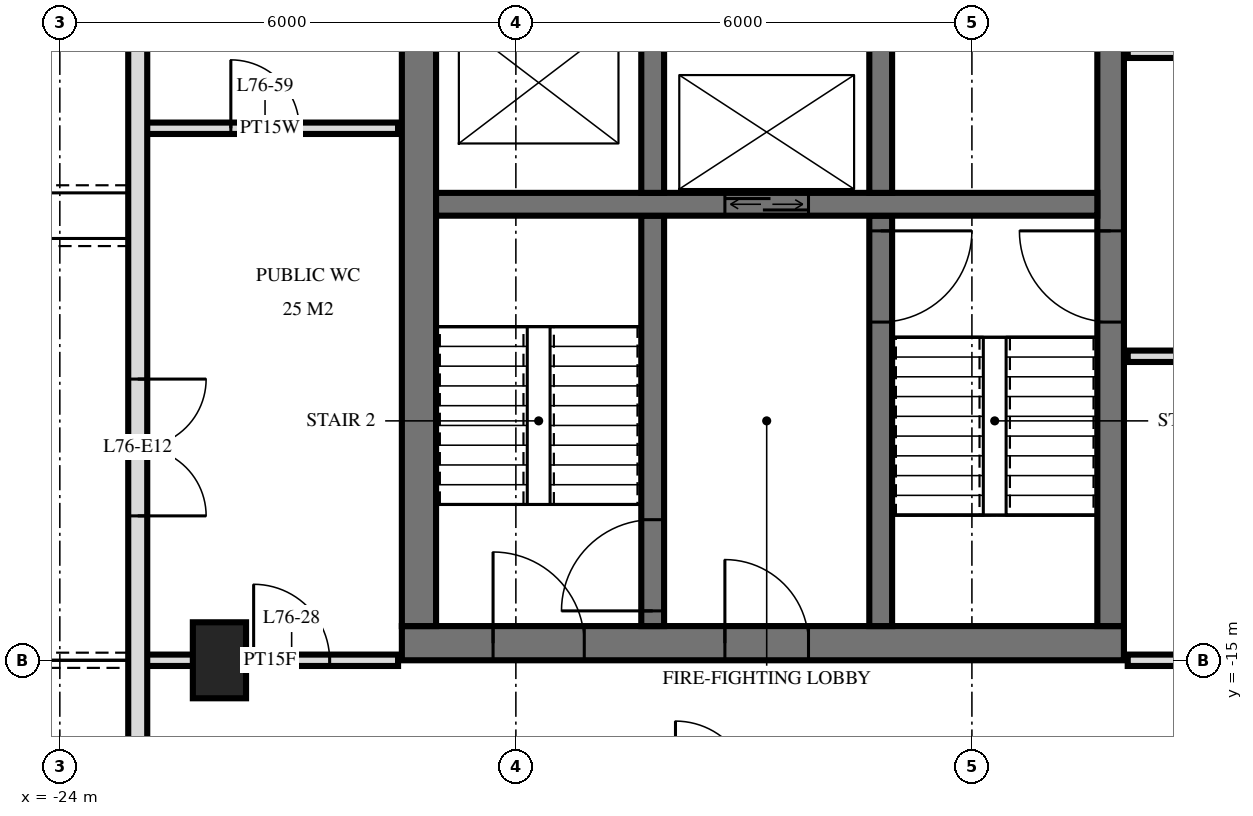
"""IFC4 building model, lengths in metres.
Left out: names, types, materials, properties, quantities, classifications, styles, units other than length and angle.
Written with IfcOpenShell. Run it as: python <this file> out.ifc"""

import sys

from ifc_helpers import new_model, si_unit, direction, frame, frame_2d, origin, origin_2d, place, context, subcontext, project, spatial, rectangle, extrude, element, fill, save


model = new_model("IFC4")
c1 = context("Model", 3, precision=1e-05, world=origin(), true_north=direction((0.0, 1.0)))
c2 = subcontext(c1, "Body", "Model", "MODEL_VIEW")
j1 = project(units=[si_unit("LENGTHUNIT", "METRE"), si_unit("PLANEANGLEUNIT", "RADIAN")], contexts=[c1])
p1 = place(None, origin())
s1 = spatial("IfcSite", under=j1, at=p1, CompositionType="ELEMENT")
p2 = place(p1, origin())
s2 = spatial("IfcBuilding", under=s1, at=p2, CompositionType="ELEMENT")
p3 = place(p2, frame((0.0, 0.0, 287.6)))
s3 = spatial("IfcBuildingStorey", under=s2, at=p3, CompositionType="ELEMENT", Elevation=287.6)
p4 = place(p3, frame((-21.9, -15.0, 0.0), z_axis=(0.0, 0.0, 1.0), x_axis=(0.0, 1.0, 0.0)))
e1 = element("IfcColumn", 1, at=p4, inside=s3, PredefinedType="COLUMN", context=c2, shape_type="SweptSolid", body=[
    extrude(rectangle(XDim=1.0, YDim=0.7, at=origin_2d()), origin(), (0.0, 0.0, 1.0), 3.5),
])
p5 = place(p3, frame((-19.5, -14.775, 0.0), z_axis=(0.0, 0.0, 1.0), x_axis=(1.0, 0.0, 0.0)))
e2 = element("IfcWall", 2, at=p5, inside=s3, PredefinedType="SHEAR", context=c2, shape_type="SweptSolid", body=[
    extrude(rectangle(XDim=9.5, YDim=0.45, at=frame_2d((4.75, 0.0))), origin(), (0.0, 0.0, 1.0), 3.5),
])
p6 = place(p5, frame((1.2, 0.0, 0.0)))
e3 = element("IfcOpeningElement", 3, at=p6, cuts=e2, PredefinedType="OPENING", context=c2, shape_type="SweptSolid", body=[
    extrude(rectangle(XDim=1.2, YDim=2.1, at=frame_2d((0.6, 1.05))), frame((0.0, 0.235, 0.0), z_axis=(0.0, -1.0, 0.0), x_axis=(1.0, 0.0, 0.0)), (0.0, 0.0, 1.0), 0.47),
])
p7 = place(p5, frame((4.25, 0.0, 0.0)))
e4 = element("IfcOpeningElement", 4, at=p7, cuts=e2, PredefinedType="OPENING", context=c2, shape_type="SweptSolid", body=[
    extrude(rectangle(XDim=1.1, YDim=2.1, at=frame_2d((0.55, 1.05))), frame((0.0, 0.235, 0.0), z_axis=(0.0, -1.0, 0.0), x_axis=(1.0, 0.0, 0.0)), (0.0, 0.0, 1.0), 0.47),
])
p8 = place(p3, frame((-10.175, -14.55, 0.0), z_axis=(0.0, 0.0, 1.0), x_axis=(0.0, 1.0, 0.0)))
e5 = element("IfcWall", 5, at=p8, inside=s3, PredefinedType="SHEAR", context=c2, shape_type="SweptSolid", body=[
    extrude(rectangle(XDim=14.1, YDim=0.35, at=frame_2d((7.05, 0.0))), origin(), (0.0, 0.0, 1.0), 3.5),
])
p9 = place(p8, frame((8.4, 0.0, 0.0)))
e6 = element("IfcOpeningElement", 6, at=p9, cuts=e5, PredefinedType="OPENING", context=c2, shape_type="SweptSolid", body=[
    extrude(rectangle(XDim=1.4, YDim=2.4, at=frame_2d((0.7, 1.2))), frame((0.0, 0.185, 0.0), z_axis=(0.0, -1.0, 0.0), x_axis=(1.0, 0.0, 0.0)), (0.0, 0.0, 1.0), 0.37),
])
p10 = place(p8, frame((10.0, 0.0, 0.0)))
e7 = element("IfcOpeningElement", 7, at=p10, cuts=e5, PredefinedType="OPENING", context=c2, shape_type="SweptSolid", body=[
    extrude(rectangle(XDim=1.4, YDim=2.4, at=frame_2d((0.7, 1.2))), frame((0.0, 0.185, 0.0), z_axis=(0.0, -1.0, 0.0), x_axis=(1.0, 0.0, 0.0)), (0.0, 0.0, 1.0), 0.37),
])
p11 = place(p8, frame((4.0, 0.0, 0.0)))
e8 = element("IfcOpeningElement", 8, at=p11, cuts=e5, PredefinedType="OPENING", context=c2, shape_type="SweptSolid", body=[
    extrude(rectangle(XDim=1.2, YDim=2.1, at=frame_2d((0.6, 1.05))), frame((0.0, 0.185, 0.0), z_axis=(0.0, -1.0, 0.0), x_axis=(1.0, 0.0, 0.0)), (0.0, 0.0, 1.0), 0.37),
])
p12 = place(p3, frame((-19.275, -14.55, 0.0), z_axis=(0.0, 0.0, 1.0), x_axis=(0.0, 1.0, 0.0)))
e9 = element("IfcWall", 9, at=p12, inside=s3, PredefinedType="SHEAR", context=c2, shape_type="SweptSolid", body=[
    extrude(rectangle(XDim=14.1, YDim=0.45, at=frame_2d((7.05, 0.0))), origin(), (0.0, 0.0, 1.0), 3.5),
])
p13 = place(p3, frame((-19.05, -9.0, 0.0), z_axis=(0.0, 0.0, 1.0), x_axis=(1.0, 0.0, 0.0)))
e10 = element("IfcWall", 10, at=p13, inside=s3, PredefinedType="SHEAR", context=c2, shape_type="SweptSolid", body=[
    extrude(rectangle(XDim=8.7, YDim=0.3, at=frame_2d((4.35, 0.0))), origin(), (0.0, 0.0, 1.0), 3.5),
])
p14 = place(p13, frame((3.8, 0.0, 0.0)))
e11 = element("IfcOpeningElement", 11, at=p14, cuts=e10, PredefinedType="OPENING", context=c2, shape_type="SweptSolid", body=[
    extrude(rectangle(XDim=1.1, YDim=2.1, at=frame_2d((0.55, 1.05))), frame((0.0, 0.16, 0.0), z_axis=(0.0, -1.0, 0.0), x_axis=(1.0, 0.0, 0.0)), (0.0, 0.0, 1.0), 0.32),
])
p15 = place(p3, frame((-13.2, -8.85, 0.0), z_axis=(0.0, 0.0, 1.0), x_axis=(0.0, 1.0, 0.0)))
e12 = element("IfcWall", 12, at=p15, inside=s3, PredefinedType="SHEAR", context=c2, shape_type="SweptSolid", body=[
    extrude(rectangle(XDim=2.3, YDim=0.3, at=frame_2d((1.15, 0.0))), origin(), (0.0, 0.0, 1.0), 3.5),
])
p16 = place(p3, frame((-13.2, -14.55, 0.0), z_axis=(0.0, 0.0, 1.0), x_axis=(0.0, 1.0, 0.0)))
e13 = element("IfcWall", 13, at=p16, inside=s3, PredefinedType="SHEAR", context=c2, shape_type="SweptSolid", body=[
    extrude(rectangle(XDim=5.4, YDim=0.3, at=frame_2d((2.7, 0.0))), origin(), (0.0, 0.0, 1.0), 3.5),
])
p17 = place(p16, frame((4.0, 0.0, 0.0)))
e14 = element("IfcOpeningElement", 14, at=p17, cuts=e13, PredefinedType="OPENING", context=c2, shape_type="SweptSolid", body=[
    extrude(rectangle(XDim=1.2, YDim=2.1, at=frame_2d((0.6, 1.05))), frame((0.0, 0.16, 0.0), z_axis=(0.0, -1.0, 0.0), x_axis=(1.0, 0.0, 0.0)), (0.0, 0.0, 1.0), 0.32),
])
p18 = place(p3, frame((-16.2, -8.85, 0.0), z_axis=(0.0, 0.0, 1.0), x_axis=(0.0, 1.0, 0.0)))
e15 = element("IfcWall", 15, at=p18, inside=s3, PredefinedType="SHEAR", context=c2, shape_type="SweptSolid", body=[
    extrude(rectangle(XDim=2.3, YDim=0.3, at=frame_2d((1.15, 0.0))), origin(), (0.0, 0.0, 1.0), 3.5),
])
p19 = place(p3, frame((-16.2, -14.55, 0.0), z_axis=(0.0, 0.0, 1.0), x_axis=(0.0, 1.0, 0.0)))
e16 = element("IfcWall", 16, at=p19, inside=s3, PredefinedType="SHEAR", context=c2, shape_type="SweptSolid", body=[
    extrude(rectangle(XDim=5.4, YDim=0.3, at=frame_2d((2.7, 0.0))), origin(), (0.0, 0.0, 1.0), 3.5),
])
p20 = place(p19, frame((0.2, 0.0, 0.0)))
e17 = element("IfcOpeningElement", 17, at=p20, cuts=e16, PredefinedType="OPENING", context=c2, shape_type="SweptSolid", body=[
    extrude(rectangle(XDim=1.2, YDim=2.1, at=frame_2d((0.6, 1.05))), frame((0.0, 0.16, 0.0), z_axis=(0.0, -1.0, 0.0), x_axis=(1.0, 0.0, 0.0)), (0.0, 0.0, 1.0), 0.32),
])
p21 = place(p3, frame((-22.975, -3.325, 0.0), z_axis=(0.0, 0.0, 1.0), x_axis=(0.0, -1.0, 0.0)))
e18 = element("IfcWall", 18, at=p21, inside=s3, PredefinedType="SOLIDWALL", context=c2, shape_type="SweptSolid", body=[
    extrude(rectangle(XDim=25.951, YDim=0.25, at=frame_2d((12.975, 0.0))), origin(), (0.0, 0.0, 1.0), 3.22),
])
p22 = place(p21, frame((1.475, 0.0, 0.0)))
e19 = element("IfcOpeningElement", 19, at=p22, cuts=e18, PredefinedType="OPENING", context=c2, shape_type="SweptSolid", body=[
    extrude(rectangle(XDim=1.8, YDim=2.4, at=frame_2d((0.9, 1.2))), frame((0.0, 0.135, 0.0), z_axis=(0.0, -1.0, 0.0), x_axis=(1.0, 0.0, 0.0)), (0.0, 0.0, 1.0), 0.27),
])
p23 = place(p21, frame((7.975, 0.0, 0.0)))
e20 = element("IfcOpeningElement", 20, at=p23, cuts=e18, PredefinedType="OPENING", context=c2, shape_type="SweptSolid", body=[
    extrude(rectangle(XDim=1.8, YDim=2.4, at=frame_2d((0.9, 1.2))), frame((0.0, 0.135, 0.0), z_axis=(0.0, -1.0, 0.0), x_axis=(1.0, 0.0, 0.0)), (0.0, 0.0, 1.0), 0.27),
])
p24 = place(p21, frame((18.175, 0.0, 0.0)))
e21 = element("IfcOpeningElement", 21, at=p24, cuts=e18, PredefinedType="OPENING", context=c2, shape_type="SweptSolid", body=[
    extrude(rectangle(XDim=1.8, YDim=2.4, at=frame_2d((0.9, 1.2))), frame((0.0, 0.135, 0.0), z_axis=(0.0, -1.0, 0.0), x_axis=(1.0, 0.0, 0.0)), (0.0, 0.0, 1.0), 0.27),
])
p25 = place(p21, frame((21.075, 0.0, 0.0)))
e22 = element("IfcOpeningElement", 22, at=p25, cuts=e18, PredefinedType="OPENING", context=c2, shape_type="SweptSolid", body=[
    extrude(rectangle(XDim=1.8, YDim=2.4, at=frame_2d((0.9, 1.2))), frame((0.0, 0.135, 0.0), z_axis=(0.0, -1.0, 0.0), x_axis=(1.0, 0.0, 0.0)), (0.0, 0.0, 1.0), 0.27),
])
p26 = place(p21, frame((23.825, 0.0, 0.9)))
e23 = element("IfcOpeningElement", 23, at=p26, cuts=e18, PredefinedType="OPENING", context=c2, shape_type="SweptSolid", body=[
    extrude(rectangle(XDim=1.8, YDim=1.5, at=frame_2d((0.9, 0.75))), frame((0.0, 0.135, 0.0), z_axis=(0.0, -1.0, 0.0), x_axis=(1.0, 0.0, 0.0)), (0.0, 0.0, 1.0), 0.27),
])
p27 = place(p3, frame((-22.92, -15.0, 0.0), z_axis=(0.0, 0.0, 1.0), x_axis=(1.0, 0.0, 0.0)))
e24 = element("IfcWall", 24, at=p27, inside=s3, PredefinedType="PARTITIONING", context=c2, shape_type="SweptSolid", body=[
    extrude(rectangle(XDim=3.37, YDim=0.15, at=frame_2d((1.685, 0.0))), origin(), (0.0, 0.0, 1.0), 3.22),
])
p28 = place(p27, frame((1.47, 0.0, 0.0)))
e25 = element("IfcOpeningElement", 25, at=p28, cuts=e24, PredefinedType="OPENING", context=c2, shape_type="SweptSolid", body=[
    extrude(rectangle(XDim=1.0, YDim=2.1, at=frame_2d((0.5, 1.05))), frame((0.0, 0.085, 0.0), z_axis=(0.0, -1.0, 0.0), x_axis=(1.0, 0.0, 0.0)), (0.0, 0.0, 1.0), 0.17),
])
p29 = place(p3, frame((-9.95, -15.0, 0.0), z_axis=(0.0, 0.0, 1.0), x_axis=(1.0, 0.0, 0.0)))
e26 = element("IfcWall", 26, at=p29, inside=s3, PredefinedType="PARTITIONING", context=c2, shape_type="SweptSolid", body=[
    extrude(rectangle(XDim=19.9, YDim=0.15, at=frame_2d((9.95, 0.0))), origin(), (0.0, 0.0, 1.0), 2.584),
])
p30 = place(p29, frame((9.45, 0.0, 0.0)))
e27 = element("IfcOpeningElement", 27, at=p30, cuts=e26, PredefinedType="OPENING", context=c2, shape_type="SweptSolid", body=[
    extrude(rectangle(XDim=1.0, YDim=2.1, at=frame_2d((0.5, 1.05))), frame((0.0, 0.085, 0.0), z_axis=(0.0, -1.0, 0.0), x_axis=(1.0, 0.0, 0.0)), (0.0, 0.0, 1.0), 0.17),
])
p31 = place(p3, frame((-9.95, -11.0, 0.0), z_axis=(0.0, 0.0, 1.0), x_axis=(1.0, 0.0, 0.0)))
e28 = element("IfcWall", 28, at=p31, inside=s3, PredefinedType="PARTITIONING", context=c2, shape_type="SweptSolid", body=[
    extrude(rectangle(XDim=19.9, YDim=0.15, at=frame_2d((9.95, 0.0))), origin(), (0.0, 0.0, 1.0), 3.22),
])
p32 = place(p31, frame((9.45, 0.0, 0.0)))
e29 = element("IfcOpeningElement", 29, at=p32, cuts=e28, PredefinedType="OPENING", context=c2, shape_type="SweptSolid", body=[
    extrude(rectangle(XDim=1.0, YDim=2.1, at=frame_2d((0.5, 1.05))), frame((0.0, 0.085, 0.0), z_axis=(0.0, -1.0, 0.0), x_axis=(1.0, 0.0, 0.0)), (0.0, 0.0, 1.0), 0.17),
])
p33 = place(p31, frame((3.45, 0.0, 0.0)))
e30 = element("IfcOpeningElement", 30, at=p33, cuts=e28, PredefinedType="OPENING", context=c2, shape_type="SweptSolid", body=[
    extrude(rectangle(XDim=1.0, YDim=2.1, at=frame_2d((0.5, 1.05))), frame((0.0, 0.085, 0.0), z_axis=(0.0, -1.0, 0.0), x_axis=(1.0, 0.0, 0.0)), (0.0, 0.0, 1.0), 0.17),
])
p34 = place(p3, frame((-22.92, -8.0, 0.0), z_axis=(0.0, 0.0, 1.0), x_axis=(1.0, 0.0, 0.0)))
e31 = element("IfcWall", 31, at=p34, inside=s3, PredefinedType="PLUMBINGWALL", context=c2, shape_type="SweptSolid", body=[
    extrude(rectangle(XDim=3.37, YDim=0.15, at=frame_2d((1.685, 0.0))), origin(), (0.0, 0.0, 1.0), 3.22),
])
p35 = place(p34, frame((1.17, 0.0, 0.0)))
e32 = element("IfcOpeningElement", 32, at=p35, cuts=e31, PredefinedType="OPENING", context=c2, shape_type="SweptSolid", body=[
    extrude(rectangle(XDim=0.9, YDim=2.1, at=frame_2d((0.45, 1.05))), frame((0.0, 0.085, 0.0), z_axis=(0.0, -1.0, 0.0), x_axis=(1.0, 0.0, 0.0)), (0.0, 0.0, 1.0), 0.17),
])
p36 = place(p3, frame((-9.95, -7.0, 0.0), z_axis=(0.0, 0.0, 1.0), x_axis=(1.0, 0.0, 0.0)))
e33 = element("IfcWall", 33, at=p36, inside=s3, PredefinedType="PARTITIONING", context=c2, shape_type="SweptSolid", body=[
    extrude(rectangle(XDim=19.9, YDim=0.15, at=frame_2d((9.95, 0.0))), origin(), (0.0, 0.0, 1.0), 3.22),
])
p37 = place(p36, frame((9.45, 0.0, 0.0)))
e34 = element("IfcOpeningElement", 34, at=p37, cuts=e33, PredefinedType="OPENING", context=c2, shape_type="SweptSolid", body=[
    extrude(rectangle(XDim=1.0, YDim=2.1, at=frame_2d((0.5, 1.05))), frame((0.0, 0.085, 0.0), z_axis=(0.0, -1.0, 0.0), x_axis=(1.0, 0.0, 0.0)), (0.0, 0.0, 1.0), 0.17),
])
p38 = place(p36, frame((15.45, 0.0, 0.0)))
e35 = element("IfcOpeningElement", 35, at=p38, cuts=e33, PredefinedType="OPENING", context=c2, shape_type="SweptSolid", body=[
    extrude(rectangle(XDim=1.0, YDim=2.1, at=frame_2d((0.5, 1.05))), frame((0.0, 0.085, 0.0), z_axis=(0.0, -1.0, 0.0), x_axis=(1.0, 0.0, 0.0)), (0.0, 0.0, 1.0), 0.17),
])
p39 = place(p23, origin())
e36 = element("IfcDoor", 36, at=p39, inside=s3, OperationType="DOUBLE_DOOR_SINGLE_SWING", PredefinedType="DOOR", context=c2, shape_type="SweptSolid", body=[
    extrude(rectangle(XDim=1.8, YDim=2.4, at=frame_2d((0.9, 1.2))), frame((0.0, 0.025, 0.0), z_axis=(0.0, -1.0, 0.0), x_axis=(1.0, 0.0, 0.0)), (0.0, 0.0, 1.0), 0.05),
])
fill(e20, e36)
p40 = place(p14, origin())
e37 = element("IfcDoor", 37, at=p40, inside=s3, OperationType="DOUBLE_DOOR_SLIDING", PredefinedType="USERDEFINED", context=c2, shape_type="SweptSolid", body=[
    extrude(rectangle(XDim=1.1, YDim=2.1, at=frame_2d((0.55, 1.05))), frame((0.0, 0.025, 0.0), z_axis=(0.0, -1.0, 0.0), x_axis=(1.0, 0.0, 0.0)), (0.0, 0.0, 1.0), 0.05),
])
fill(e11, e37)
p41 = place(p11, origin())
e38 = element("IfcDoor", 38, at=p41, inside=s3, OperationType="SINGLE_SWING_LEFT", PredefinedType="DOOR", context=c2, shape_type="SweptSolid", body=[
    extrude(rectangle(XDim=1.2, YDim=2.1, at=frame_2d((0.6, 1.05))), frame((0.0, 0.025, 0.0), z_axis=(0.0, -1.0, 0.0), x_axis=(1.0, 0.0, 0.0)), (0.0, 0.0, 1.0), 0.05),
])
fill(e8, e38)
p42 = place(p6, origin())
e39 = element("IfcDoor", 39, at=p42, inside=s3, OperationType="SINGLE_SWING_RIGHT", PredefinedType="DOOR", context=c2, shape_type="SweptSolid", body=[
    extrude(rectangle(XDim=1.2, YDim=2.1, at=frame_2d((0.6, 1.05))), frame((0.0, 0.025, 0.0), z_axis=(0.0, -1.0, 0.0), x_axis=(1.0, 0.0, 0.0)), (0.0, 0.0, 1.0), 0.05),
])
fill(e3, e39)
p43 = place(p7, origin())
e40 = element("IfcDoor", 40, at=p43, inside=s3, OperationType="SINGLE_SWING_RIGHT", PredefinedType="DOOR", context=c2, shape_type="SweptSolid", body=[
    extrude(rectangle(XDim=1.1, YDim=2.1, at=frame_2d((0.55, 1.05))), frame((0.0, 0.025, 0.0), z_axis=(0.0, -1.0, 0.0), x_axis=(1.0, 0.0, 0.0)), (0.0, 0.0, 1.0), 0.05),
])
fill(e4, e40)
p44 = place(p17, frame((0.6, 0.0, 0.0), z_axis=(0.0, 0.0, 1.0), x_axis=(-1.0, 0.0, 0.0)))
e41 = element("IfcDoor", 41, at=p44, inside=s3, OperationType="SINGLE_SWING_RIGHT", PredefinedType="DOOR", context=c2, shape_type="SweptSolid", body=[
    extrude(rectangle(XDim=1.2, YDim=2.1, at=frame_2d((0.0, 1.05))), frame((0.0, -0.025, 0.0), z_axis=(0.0, 1.0, 0.0), x_axis=(-1.0, 0.0, 0.0)), (0.0, 0.0, 1.0), 0.05),
])
fill(e14, e41)
p45 = place(p20, origin())
e42 = element("IfcDoor", 42, at=p45, inside=s3, OperationType="SINGLE_SWING_RIGHT", PredefinedType="DOOR", context=c2, shape_type="SweptSolid", body=[
    extrude(rectangle(XDim=1.2, YDim=2.1, at=frame_2d((0.6, 1.05))), frame((0.0, 0.025, 0.0), z_axis=(0.0, -1.0, 0.0), x_axis=(1.0, 0.0, 0.0)), (0.0, 0.0, 1.0), 0.05),
])
fill(e17, e42)
p46 = place(p28, origin())
e43 = element("IfcDoor", 43, at=p46, inside=s3, OperationType="SINGLE_SWING_RIGHT", PredefinedType="DOOR", context=c2, shape_type="SweptSolid", body=[
    extrude(rectangle(XDim=1.0, YDim=2.1, at=frame_2d((0.5, 1.05))), frame((0.0, 0.025, 0.0), z_axis=(0.0, -1.0, 0.0), x_axis=(1.0, 0.0, 0.0)), (0.0, 0.0, 1.0), 0.05),
])
fill(e25, e43)
p47 = place(p35, origin())
e44 = element("IfcDoor", 44, at=p47, inside=s3, OperationType="SINGLE_SWING_RIGHT", PredefinedType="DOOR", context=c2, shape_type="SweptSolid", body=[
    extrude(rectangle(XDim=0.9, YDim=2.1, at=frame_2d((0.45, 1.05))), frame((0.0, 0.025, 0.0), z_axis=(0.0, -1.0, 0.0), x_axis=(1.0, 0.0, 0.0)), (0.0, 0.0, 1.0), 0.05),
])
fill(e32, e44)
save(model, sys.argv[1])
